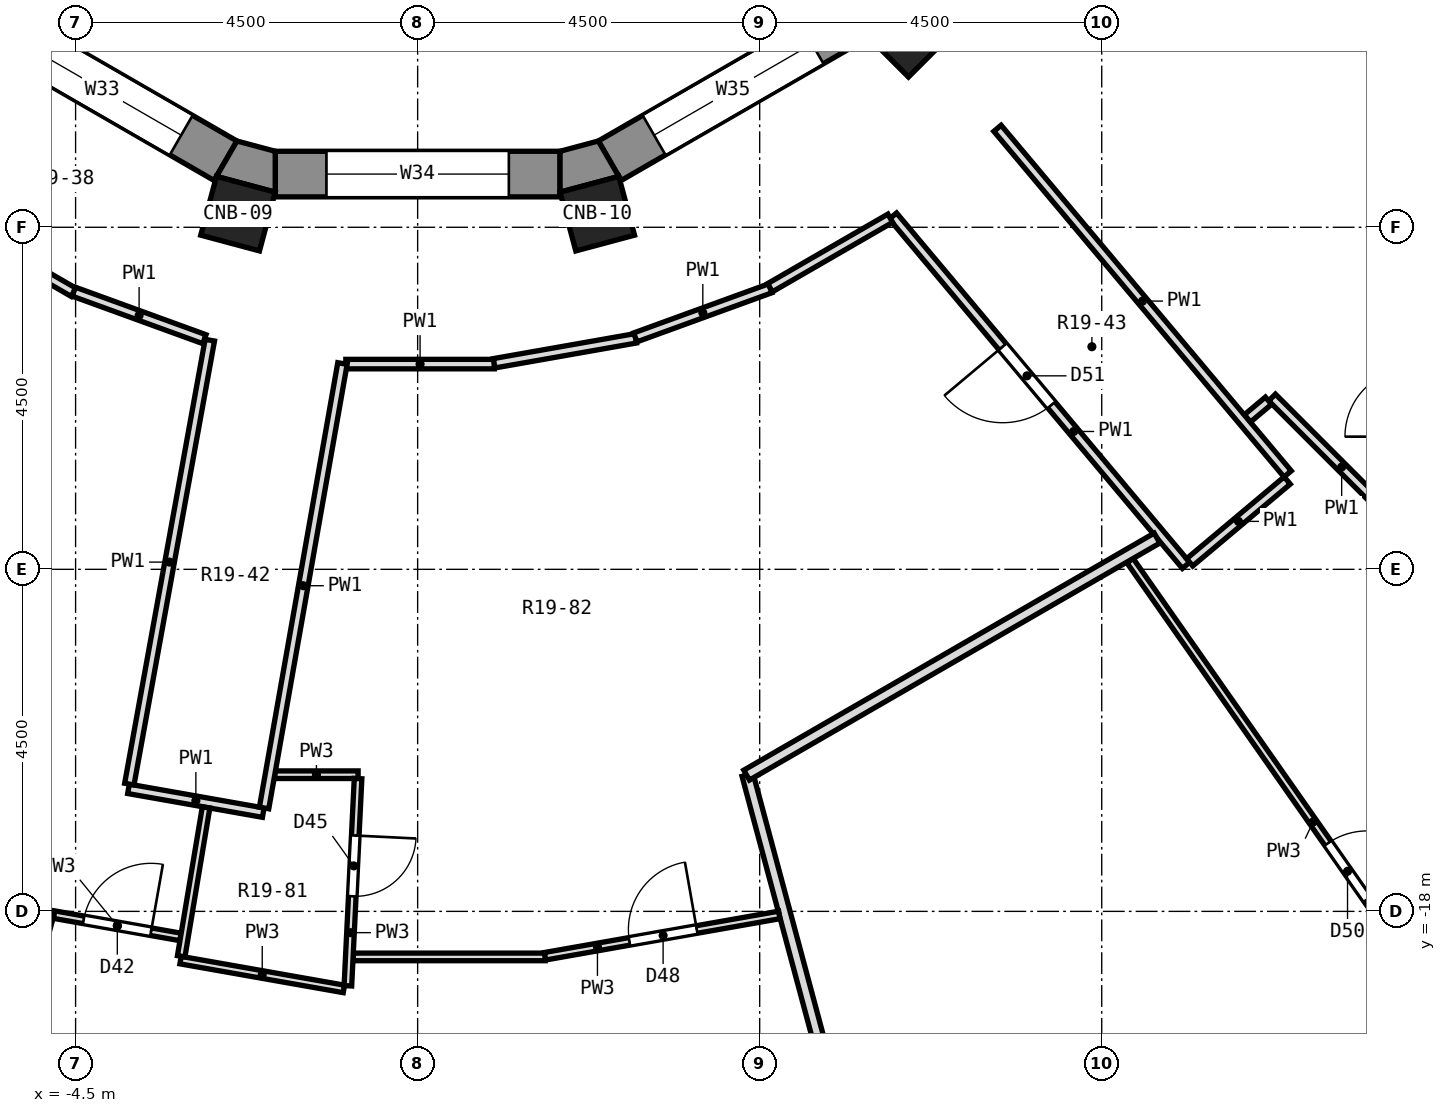
"""IFC4 building model, lengths in metres.
Left out: names, types, materials, properties, quantities, classifications, styles, units other than length and angle.
Written with IfcOpenShell. Run it as: python <this file> out.ifc"""

import sys

from ifc_helpers import new_model, si_unit, direction, frame, frame_2d, origin, origin_2d, place, context, subcontext, project, spatial, polyline, rectangle, outline, extrude, element, fill, save


model = new_model("IFC4")
c1 = context("Model", 3, precision=1e-05, world=origin(), true_north=direction((0.0, 1.0)))
c2 = subcontext(c1, "Body", "Model", "MODEL_VIEW")
j1 = project(units=[si_unit("LENGTHUNIT", "METRE"), si_unit("PLANEANGLEUNIT", "RADIAN")], contexts=[c1])
p1 = place(None, origin())
s1 = spatial("IfcSite", under=j1, at=p1, CompositionType="ELEMENT")
p2 = place(p1, origin())
s2 = spatial("IfcBuilding", under=s1, at=p2, CompositionType="ELEMENT")
p3 = place(p2, frame((0.0, 0.0, 111.7)))
s3 = spatial("IfcBuildingStorey", under=s2, at=p3, CompositionType="ELEMENT", Elevation=111.7)
for number, where, z_axis, x_axis in (
    (1, (-2.364, -8.821, 0.0), (0.0, 0.0, 1.0), (-0.259, -0.966, 0.0)),
    (2, (2.364, -8.821, 0.0), (0.0, 0.0, 1.0), (0.259, -0.966, 0.0)),
    (3, (6.458, -6.458, 0.0), (0.0, 0.0, 1.0), (0.707, -0.707, 0.0)),
):
    element("IfcColumn", number, at=place(p3, frame(where, z_axis=z_axis, x_axis=x_axis)), inside=s3, PredefinedType="COLUMN", context=c2, shape_type="SweptSolid", body=[
        extrude(rectangle(XDim=0.8, YDim=0.8, at=origin_2d()), origin(), (0.0, 0.0, 1.0), 3.3),
    ])
p4 = place(p3, frame((-5.773, -6.251, 0.0), z_axis=(0.0, 0.0, 1.0), x_axis=(0.86604563398, -0.499964958637, 0.0)))
e4 = element("IfcWall", 4, at=p4, inside=s3, PredefinedType="SOLIDWALL", context=c2, shape_type="SweptSolid", body=[
    extrude(rectangle(XDim=3.747, YDim=0.6, at=frame_2d((1.874, 0.0))), origin(), (0.0, 0.0, 1.0), 2.8),
])
p5 = place(p4, frame((0.674, 0.0, 0.9)))
e5 = element("IfcOpeningElement", 5, at=p5, cuts=e4, PredefinedType="OPENING", context=c2, shape_type="SweptSolid", body=[
    extrude(rectangle(XDim=2.4, YDim=1.8, at=frame_2d((1.2, 0.9))), frame((0.0, 0.312, 0.0), z_axis=(0.0, -1.0, 0.0), x_axis=(1.0, 0.0, 0.0)), (0.0, 0.0, 1.0), 0.624),
])
p6 = place(p3, frame((-1.874, -8.3, 0.0), z_axis=(0.0, 0.0, 1.0), x_axis=(1.0, 0.0, 0.0)))
e6 = element("IfcWall", 6, at=p6, inside=s3, PredefinedType="SOLIDWALL", context=c2, shape_type="SweptSolid", body=[
    extrude(rectangle(XDim=3.748, YDim=0.6, at=frame_2d((1.874, 0.0))), origin(), (0.0, 0.0, 1.0), 2.8),
])
p7 = place(p6, frame((0.674, 0.0, 0.9)))
e7 = element("IfcOpeningElement", 7, at=p7, cuts=e6, PredefinedType="OPENING", context=c2, shape_type="SweptSolid", body=[
    extrude(rectangle(XDim=2.4, YDim=1.8, at=frame_2d((1.2, 0.9))), frame((0.0, 0.312, 0.0), z_axis=(0.0, -1.0, 0.0), x_axis=(1.0, 0.0, 0.0)), (0.0, 0.0, 1.0), 0.624),
])
p8 = place(p3, frame((2.527, -8.125, 0.0), z_axis=(0.0, 0.0, 1.0), x_axis=(0.86604563398, 0.499964958637, 0.0)))
e8 = element("IfcWall", 8, at=p8, inside=s3, PredefinedType="SOLIDWALL", context=c2, shape_type="SweptSolid", body=[
    extrude(rectangle(XDim=3.747, YDim=0.6, at=frame_2d((1.874, 0.0))), origin(), (0.0, 0.0, 1.0), 2.8),
])
p9 = place(p8, frame((0.674, 0.0, 0.9)))
e9 = element("IfcOpeningElement", 9, at=p9, cuts=e8, PredefinedType="OPENING", context=c2, shape_type="SweptSolid", body=[
    extrude(rectangle(XDim=2.4, YDim=1.8, at=frame_2d((1.2, 0.9))), frame((0.0, 0.312, 0.0), z_axis=(0.0, -1.0, 0.0), x_axis=(1.0, 0.0, 0.0)), (0.0, 0.0, 1.0), 0.624),
])
p10 = place(p3, origin())
e10 = element("IfcWall", 10, at=p10, inside=s3, PredefinedType="SOLIDWALL", context=c2, shape_type="SweptSolid", body=[
    extrude(outline(polyline([(-1.874, -8.538), (-1.874, -8.0), (-2.377, -7.865), (-2.646, -8.331), (-1.874, -8.538)])), origin(), (0.0, 0.0, 1.0), 2.8),
])
p11 = place(p3, origin())
e11 = element("IfcWall", 11, at=p11, inside=s3, PredefinedType="SOLIDWALL", context=c2, shape_type="SweptSolid", body=[
    extrude(outline(polyline([(2.646, -8.331), (2.377, -7.865), (1.874, -8.0), (1.874, -8.538), (2.646, -8.331)])), origin(), (0.0, 0.0, 1.0), 2.8),
])
p12 = place(p3, frame((4.34, -16.204, 0.0), z_axis=(0.0, 0.0, 1.0), x_axis=(0.259146062247, -0.965838142973, 0.0)))
e12 = element("IfcWall", 12, at=p12, inside=s3, PredefinedType="PARTITIONING", context=c2, shape_type="SweptSolid", body=[
    extrude(rectangle(XDim=8.89, YDim=0.15, at=frame_2d((4.445, 0.0))), origin(), (0.0, 0.0, 1.0), 2.8),
])
p13 = place(p3, frame((9.371, -13.385, 0.0), z_axis=(0.0, 0.0, 1.0), x_axis=(0.573555460551, -0.819166731302, 0.0)))
e13 = element("IfcWall", 13, at=p13, inside=s3, PredefinedType="PARTITIONING", context=c2, shape_type="SweptSolid", body=[
    extrude(rectangle(XDim=9.326, YDim=0.1, at=frame_2d((4.663, 0.0))), origin(), (0.0, 0.0, 1.0), 2.8),
])
p14 = place(p13, frame((4.541, 0.0, 0.0)))
e14 = element("IfcOpeningElement", 14, at=p14, cuts=e13, PredefinedType="OPENING", context=c2, shape_type="SweptSolid", body=[
    extrude(rectangle(XDim=0.9, YDim=2.1, at=frame_2d((0.45, 1.05))), frame((0.0, 0.062, 0.0), z_axis=(0.0, -1.0, 0.0), x_axis=(1.0, 0.0, 0.0)), (0.0, 0.0, 1.0), 0.124),
])
p15 = place(p3, frame((6.253, -8.852, 0.0), z_axis=(0.0, 0.0, 1.0), x_axis=(0.642738639283, -0.766085531499, 0.0)))
e15 = element("IfcWall", 15, at=p15, inside=s3, PredefinedType="PARTITIONING", context=c2, shape_type="SweptSolid", body=[
    extrude(rectangle(XDim=5.999, YDim=0.125, at=frame_2d((3.0, 0.0))), origin(), (0.0, 0.0, 1.0), 2.8),
])
p16 = place(p15, frame((2.244, 0.0, 0.0)))
e16 = element("IfcOpeningElement", 16, at=p16, cuts=e15, PredefinedType="OPENING", context=c2, shape_type="SweptSolid", body=[
    extrude(rectangle(XDim=1.0, YDim=2.1, at=frame_2d((0.5, 1.05))), frame((0.0, 0.074, 0.0), z_axis=(0.0, -1.0, 0.0), x_axis=(1.0, 0.0, 0.0)), (0.0, 0.0, 1.0), 0.149),
])
p17 = place(p3, frame((7.629, -7.698, 0.0), z_axis=(0.0, 0.0, 1.0), x_axis=(0.642971202284, -0.76589035314, 0.0)))
e17 = element("IfcWall", 17, at=p17, inside=s3, PredefinedType="PARTITIONING", context=c2, shape_type="SweptSolid", body=[
    extrude(rectangle(XDim=5.937, YDim=0.125, at=frame_2d((2.968, 0.0))), origin(), (0.0, 0.0, 1.0), 2.8),
])
p18 = place(p3, frame((11.241, -11.239, 0.0), z_axis=(0.0, 0.0, 1.0), x_axis=(0.707106781187, -0.707106781187, 0.0)))
e18 = element("IfcWall", 18, at=p18, inside=s3, PredefinedType="PARTITIONING", context=c2, shape_type="SweptSolid", body=[
    extrude(rectangle(XDim=2.591, YDim=0.125, at=frame_2d((1.295, 0.0))), origin(), (0.0, 0.0, 1.0), 2.8),
])
p19 = place(p3, frame((-6.163, -8.91, 0.0), z_axis=(0.0, 0.0, 1.0), x_axis=(0.865856369022, -0.500292662572, 0.0)))
e19 = element("IfcWall", 19, at=p19, inside=s3, PredefinedType="PARTITIONING", context=c2, shape_type="SweptSolid", body=[
    extrude(rectangle(XDim=1.89, YDim=0.125, at=frame_2d((0.945, 0.0))), origin(), (0.0, 0.0, 1.0), 2.8),
])
p20 = place(p3, frame((-7.843, -16.938, 0.0), z_axis=(0.0, 0.0, 1.0), x_axis=(0.939697033511, -0.34200801922, 0.0)))
e20 = element("IfcWall", 20, at=p20, inside=s3, PredefinedType="PARTITIONING", context=c2, shape_type="SweptSolid", body=[
    extrude(rectangle(XDim=3.255, YDim=0.1, at=frame_2d((1.627, 0.0))), origin(), (0.0, 0.0, 1.0), 2.8),
])
p21 = place(p20, frame((1.127, 0.0, 0.0)))
e21 = element("IfcOpeningElement", 21, at=p21, cuts=e20, PredefinedType="OPENING", context=c2, shape_type="SweptSolid", body=[
    extrude(rectangle(XDim=0.9, YDim=2.1, at=frame_2d((0.45, 1.05))), frame((0.0, 0.062, 0.0), z_axis=(0.0, -1.0, 0.0), x_axis=(1.0, 0.0, 0.0)), (0.0, 0.0, 1.0), 0.124),
])
p22 = place(p3, frame((-4.523, -9.847, 0.0), z_axis=(0.0, 0.0, 1.0), x_axis=(0.939758316357, -0.341839592261, 0.0)))
e22 = element("IfcWall", 22, at=p22, inside=s3, PredefinedType="PARTITIONING", context=c2, shape_type="SweptSolid", body=[
    extrude(rectangle(XDim=1.828, YDim=0.125, at=frame_2d((0.914, 0.0))), origin(), (0.0, 0.0, 1.0), 2.8),
])
p23 = place(p3, frame((-3.119, -18.641, 0.0), z_axis=(0.0, 0.0, 1.0), x_axis=(0.984804954455, -0.173664048326, 0.0)))
e23 = element("IfcWall", 23, at=p23, inside=s3, PredefinedType="PARTITIONING", context=c2, shape_type="SweptSolid", body=[
    extrude(rectangle(XDim=2.182, YDim=0.1, at=frame_2d((1.091, 0.0))), origin(), (0.0, 0.0, 1.0), 2.8),
])
p24 = place(p3, frame((-4.783, -18.043, 0.0), z_axis=(0.0, 0.0, 1.0), x_axis=(0.98477046178, -0.173859534124, 0.0)))
e24 = element("IfcWall", 24, at=p24, inside=s3, PredefinedType="PARTITIONING", context=c2, shape_type="SweptSolid", body=[
    extrude(rectangle(XDim=1.689, YDim=0.1, at=frame_2d((0.845, 0.0))), origin(), (0.0, 0.0, 1.0), 2.8),
])
p25 = place(p24, frame((0.395, 0.0, 0.0)))
e25 = element("IfcOpeningElement", 25, at=p25, cuts=e24, PredefinedType="OPENING", context=c2, shape_type="SweptSolid", body=[
    extrude(rectangle(XDim=0.9, YDim=2.1, at=frame_2d((0.45, 1.05))), frame((0.0, 0.062, 0.0), z_axis=(0.0, -1.0, 0.0), x_axis=(1.0, 0.0, 0.0)), (0.0, 0.0, 1.0), 0.124),
])
p26 = place(p3, frame((-3.804, -16.388, 0.0), z_axis=(0.0, 0.0, 1.0), x_axis=(0.984772635564, -0.173847220985, 0.0)))
e26 = element("IfcWall", 26, at=p26, inside=s3, PredefinedType="PARTITIONING", context=c2, shape_type="SweptSolid", body=[
    extrude(rectangle(XDim=1.8, YDim=0.125, at=frame_2d((0.9, 0.0))), origin(), (0.0, 0.0, 1.0), 2.8),
])
p27 = place(p3, frame((-0.849, -18.599, 0.0), z_axis=(0.0, 0.0, 1.0), x_axis=(1.0, 0.0, 0.0)))
e27 = element("IfcWall", 27, at=p27, inside=s3, PredefinedType="PARTITIONING", context=c2, shape_type="SweptSolid", body=[
    extrude(rectangle(XDim=2.527, YDim=0.1, at=frame_2d((1.263, 0.0))), origin(), (0.0, 0.0, 1.0), 2.8),
])
p28 = place(p3, frame((-1.881, -16.202, 0.0), z_axis=(0.0, 0.0, 1.0), x_axis=(1.0, 0.0, 0.0)))
e28 = element("IfcWall", 28, at=p28, inside=s3, PredefinedType="PARTITIONING", context=c2, shape_type="SweptSolid", body=[
    extrude(rectangle(XDim=1.098, YDim=0.1, at=frame_2d((0.549, 0.0))), origin(), (0.0, 0.0, 1.0), 2.8),
])
p29 = place(p3, frame((-0.945, -10.8, 0.0), z_axis=(0.0, 0.0, 1.0), x_axis=(1.0, 0.0, 0.0)))
e29 = element("IfcWall", 29, at=p29, inside=s3, PredefinedType="PARTITIONING", context=c2, shape_type="SweptSolid", body=[
    extrude(rectangle(XDim=1.954, YDim=0.125, at=frame_2d((0.977, 0.0))), origin(), (0.0, 0.0, 1.0), 2.8),
])
p30 = place(p3, frame((1.676, -18.59, 0.0), z_axis=(0.0, 0.0, 1.0), x_axis=(0.984818097546, 0.173589500677, 0.0)))
e30 = element("IfcWall", 30, at=p30, inside=s3, PredefinedType="PARTITIONING", context=c2, shape_type="SweptSolid", body=[
    extrude(rectangle(XDim=3.129, YDim=0.1, at=frame_2d((1.565, 0.0))), origin(), (0.0, 0.0, 1.0), 2.8),
])
p31 = place(p30, frame((1.127, 0.0, 0.0)))
e31 = element("IfcOpeningElement", 31, at=p31, cuts=e30, PredefinedType="OPENING", context=c2, shape_type="SweptSolid", body=[
    extrude(rectangle(XDim=0.9, YDim=2.1, at=frame_2d((0.45, 1.05))), frame((0.0, 0.062, 0.0), z_axis=(0.0, -1.0, 0.0), x_axis=(1.0, 0.0, 0.0)), (0.0, 0.0, 1.0), 0.124),
])
p32 = place(p3, frame((1.007, -10.789, 0.0), z_axis=(0.0, 0.0, 1.0), x_axis=(0.984818645033, 0.173586394613, 0.0)))
e32 = element("IfcWall", 32, at=p32, inside=s3, PredefinedType="PARTITIONING", context=c2, shape_type="SweptSolid", body=[
    extrude(rectangle(XDim=1.89, YDim=0.125, at=frame_2d((0.945, 0.0))), origin(), (0.0, 0.0, 1.0), 2.8),
])
p33 = place(p3, frame((2.864, -10.449, 0.0), z_axis=(0.0, 0.0, 1.0), x_axis=(0.939733090163, 0.341908934151, 0.0)))
e33 = element("IfcWall", 33, at=p33, inside=s3, PredefinedType="PARTITIONING", context=c2, shape_type="SweptSolid", body=[
    extrude(rectangle(XDim=1.891, YDim=0.125, at=frame_2d((0.945, 0.0))), origin(), (0.0, 0.0, 1.0), 2.8),
])
p34 = place(p3, frame((4.328, -16.208, 0.0), z_axis=(0.0, 0.0, 1.0), x_axis=(0.865952126022, 0.500126899334, 0.0)))
e34 = element("IfcWall", 34, at=p34, inside=s3, PredefinedType="PARTITIONING", context=c2, shape_type="SweptSolid", body=[
    extrude(rectangle(XDim=6.235, YDim=0.15, at=frame_2d((3.118, 0.0))), origin(), (0.0, 0.0, 1.0), 2.8),
])
p35 = place(p3, frame((4.636, -9.795, 0.0), z_axis=(0.0, 0.0, 1.0), x_axis=(0.865889515344, 0.500235291855, 0.0)))
e35 = element("IfcWall", 35, at=p35, inside=s3, PredefinedType="PARTITIONING", context=c2, shape_type="SweptSolid", body=[
    extrude(rectangle(XDim=1.827, YDim=0.125, at=frame_2d((0.913, 0.0))), origin(), (0.0, 0.0, 1.0), 2.8),
])
p36 = place(p3, frame((10.157, -13.408, 0.0), z_axis=(0.0, 0.0, 1.0), x_axis=(0.766066523004, 0.642761294986, 0.0)))
e36 = element("IfcWall", 36, at=p36, inside=s3, PredefinedType="PARTITIONING", context=c2, shape_type="SweptSolid", body=[
    extrude(rectangle(XDim=1.675, YDim=0.125, at=frame_2d((0.837, 0.0))), origin(), (0.0, 0.0, 1.0), 2.8),
])
p37 = place(p3, frame((10.917, -11.514, 0.0), z_axis=(0.0, 0.0, 1.0), x_axis=(0.765718201941, 0.643176208527, 0.0)))
e37 = element("IfcWall", 37, at=p37, inside=s3, PredefinedType="PARTITIONING", context=c2, shape_type="SweptSolid", body=[
    extrude(rectangle(XDim=0.361, YDim=0.125, at=frame_2d((0.18, 0.0))), origin(), (0.0, 0.0, 1.0), 2.8),
])
p38 = place(p3, frame((-6.642, -24.791, 0.0), z_axis=(0.0, 0.0, 1.0), x_axis=(0.258515851323, 0.966007015821, 0.0)))
e38 = element("IfcWall", 38, at=p38, inside=s3, PredefinedType="PARTITIONING", context=c2, shape_type="SweptSolid", body=[
    extrude(rectangle(XDim=6.945, YDim=0.1, at=frame_2d((3.473, 0.0))), origin(), (0.0, 0.0, 1.0), 2.8),
])
p39 = place(p3, frame((-3.793, -16.325, 0.0), z_axis=(0.0, 0.0, 1.0), x_axis=(0.178389527964, 0.983959946498, 0.0)))
e39 = element("IfcWall", 39, at=p39, inside=s3, PredefinedType="PARTITIONING", context=c2, shape_type="SweptSolid", body=[
    extrude(rectangle(XDim=5.936, YDim=0.125, at=frame_2d((2.968, 0.0))), origin(), (0.0, 0.0, 1.0), 2.8),
])
p40 = place(p3, frame((-2.02, -16.639, 0.0), z_axis=(0.0, 0.0, 1.0), x_axis=(0.17368681293, 0.984800939791, 0.0)))
e40 = element("IfcWall", 40, at=p40, inside=s3, PredefinedType="PARTITIONING", context=c2, shape_type="SweptSolid", body=[
    extrude(rectangle(XDim=5.938, YDim=0.125, at=frame_2d((2.969, 0.0))), origin(), (0.0, 0.0, 1.0), 2.8),
])
p41 = place(p3, frame((-3.111, -18.591, 0.0), z_axis=(0.0, 0.0, 1.0), x_axis=(0.164837501203, 0.986320737994, 0.0)))
e41 = element("IfcWall", 41, at=p41, inside=s3, PredefinedType="PARTITIONING", context=c2, shape_type="SweptSolid", body=[
    extrude(rectangle(XDim=1.986, YDim=0.1, at=frame_2d((0.993, 0.0))), origin(), (0.0, 0.0, 1.0), 2.8),
])
p42 = place(p3, frame((-0.918, -18.979, 0.0), z_axis=(0.0, 0.0, 1.0), x_axis=(0.049018559161, 0.998797867868, 0.0)))
e42 = element("IfcWall", 42, at=p42, inside=s3, PredefinedType="PARTITIONING", context=c2, shape_type="SweptSolid", body=[
    extrude(rectangle(XDim=2.729, YDim=0.1, at=frame_2d((1.365, 0.0))), origin(), (0.0, 0.0, 1.0), 2.8),
])
p43 = place(p42, frame((1.179, 0.0, 0.0)))
e43 = element("IfcOpeningElement", 43, at=p43, cuts=e42, PredefinedType="OPENING", context=c2, shape_type="SweptSolid", body=[
    extrude(rectangle(XDim=0.8, YDim=2.1, at=frame_2d((0.4, 1.05))), frame((0.0, 0.062, 0.0), z_axis=(0.0, -1.0, 0.0), x_axis=(1.0, 0.0, 0.0)), (0.0, 0.0, 1.0), 0.124),
])
p44 = place(p5, origin())
e44 = element("IfcWindow", 44, at=p44, inside=s3, PartitioningType="SINGLE_PANEL", PredefinedType="WINDOW", context=c2, shape_type="SweptSolid", body=[
    extrude(rectangle(XDim=2.4, YDim=1.8, at=frame_2d((1.2, 0.9))), frame((0.0, -0.12, 0.0), z_axis=(0.0, -1.0, 0.0), x_axis=(1.0, 0.0, 0.0)), (0.0, 0.0, 1.0), 0.06),
])
fill(e5, e44)
p45 = place(p7, origin())
e45 = element("IfcWindow", 45, at=p45, inside=s3, PartitioningType="SINGLE_PANEL", PredefinedType="WINDOW", context=c2, shape_type="SweptSolid", body=[
    extrude(rectangle(XDim=2.4, YDim=1.8, at=frame_2d((1.2, 0.9))), frame((0.0, -0.12, 0.0), z_axis=(0.0, -1.0, 0.0), x_axis=(1.0, 0.0, 0.0)), (0.0, 0.0, 1.0), 0.06),
])
fill(e7, e45)
p46 = place(p9, origin())
e46 = element("IfcWindow", 46, at=p46, inside=s3, PartitioningType="SINGLE_PANEL", PredefinedType="WINDOW", context=c2, shape_type="SweptSolid", body=[
    extrude(rectangle(XDim=2.4, YDim=1.8, at=frame_2d((1.2, 0.9))), frame((0.0, -0.12, 0.0), z_axis=(0.0, -1.0, 0.0), x_axis=(1.0, 0.0, 0.0)), (0.0, 0.0, 1.0), 0.06),
])
fill(e9, e46)
p47 = place(p25, origin())
e47 = element("IfcDoor", 47, at=p47, inside=s3, OperationType="SINGLE_SWING_RIGHT", PredefinedType="DOOR", context=c2, shape_type="SweptSolid", body=[
    extrude(rectangle(XDim=0.9, YDim=2.1, at=frame_2d((0.45, 1.05))), frame((0.0, 0.025, 0.0), z_axis=(0.0, -1.0, 0.0), x_axis=(1.0, 0.0, 0.0)), (0.0, 0.0, 1.0), 0.05),
])
fill(e25, e47)
p48 = place(p43, frame((0.8, 0.0, 0.0), z_axis=(0.0, 0.0, 1.0), x_axis=(-1.0, 0.0, 0.0)))
e48 = element("IfcDoor", 48, at=p48, inside=s3, OperationType="SINGLE_SWING_LEFT", PredefinedType="DOOR", context=c2, shape_type="SweptSolid", body=[
    extrude(rectangle(XDim=0.8, YDim=2.1, at=frame_2d((0.4, 1.05))), frame((0.0, 0.025, 0.0), z_axis=(0.0, -1.0, 0.0), x_axis=(1.0, 0.0, 0.0)), (0.0, 0.0, 1.0), 0.05),
])
fill(e43, e48)
p49 = place(p31, origin())
e49 = element("IfcDoor", 49, at=p49, inside=s3, OperationType="SINGLE_SWING_RIGHT", PredefinedType="DOOR", context=c2, shape_type="SweptSolid", body=[
    extrude(rectangle(XDim=0.9, YDim=2.1, at=frame_2d((0.45, 1.05))), frame((0.0, 0.025, 0.0), z_axis=(0.0, -1.0, 0.0), x_axis=(1.0, 0.0, 0.0)), (0.0, 0.0, 1.0), 0.05),
])
fill(e31, e49)
p50 = place(p14, origin())
e50 = element("IfcDoor", 50, at=p50, inside=s3, OperationType="SINGLE_SWING_RIGHT", PredefinedType="DOOR", context=c2, shape_type="SweptSolid", body=[
    extrude(rectangle(XDim=0.9, YDim=2.1, at=frame_2d((0.45, 1.05))), frame((0.0, 0.025, 0.0), z_axis=(0.0, -1.0, 0.0), x_axis=(1.0, 0.0, 0.0)), (0.0, 0.0, 1.0), 0.05),
])
fill(e14, e50)
p51 = place(p16, frame((1.0, 0.0, 0.0), z_axis=(0.0, 0.0, 1.0), x_axis=(-1.0, 0.0, 0.0)))
e51 = element("IfcDoor", 51, at=p51, inside=s3, OperationType="SINGLE_SWING_RIGHT", PredefinedType="DOOR", context=c2, shape_type="SweptSolid", body=[
    extrude(rectangle(XDim=1.0, YDim=2.1, at=frame_2d((0.5, 1.05))), frame((0.0, 0.025, 0.0), z_axis=(0.0, -1.0, 0.0), x_axis=(1.0, 0.0, 0.0)), (0.0, 0.0, 1.0), 0.05),
])
fill(e16, e51)
save(model, sys.argv[1])
